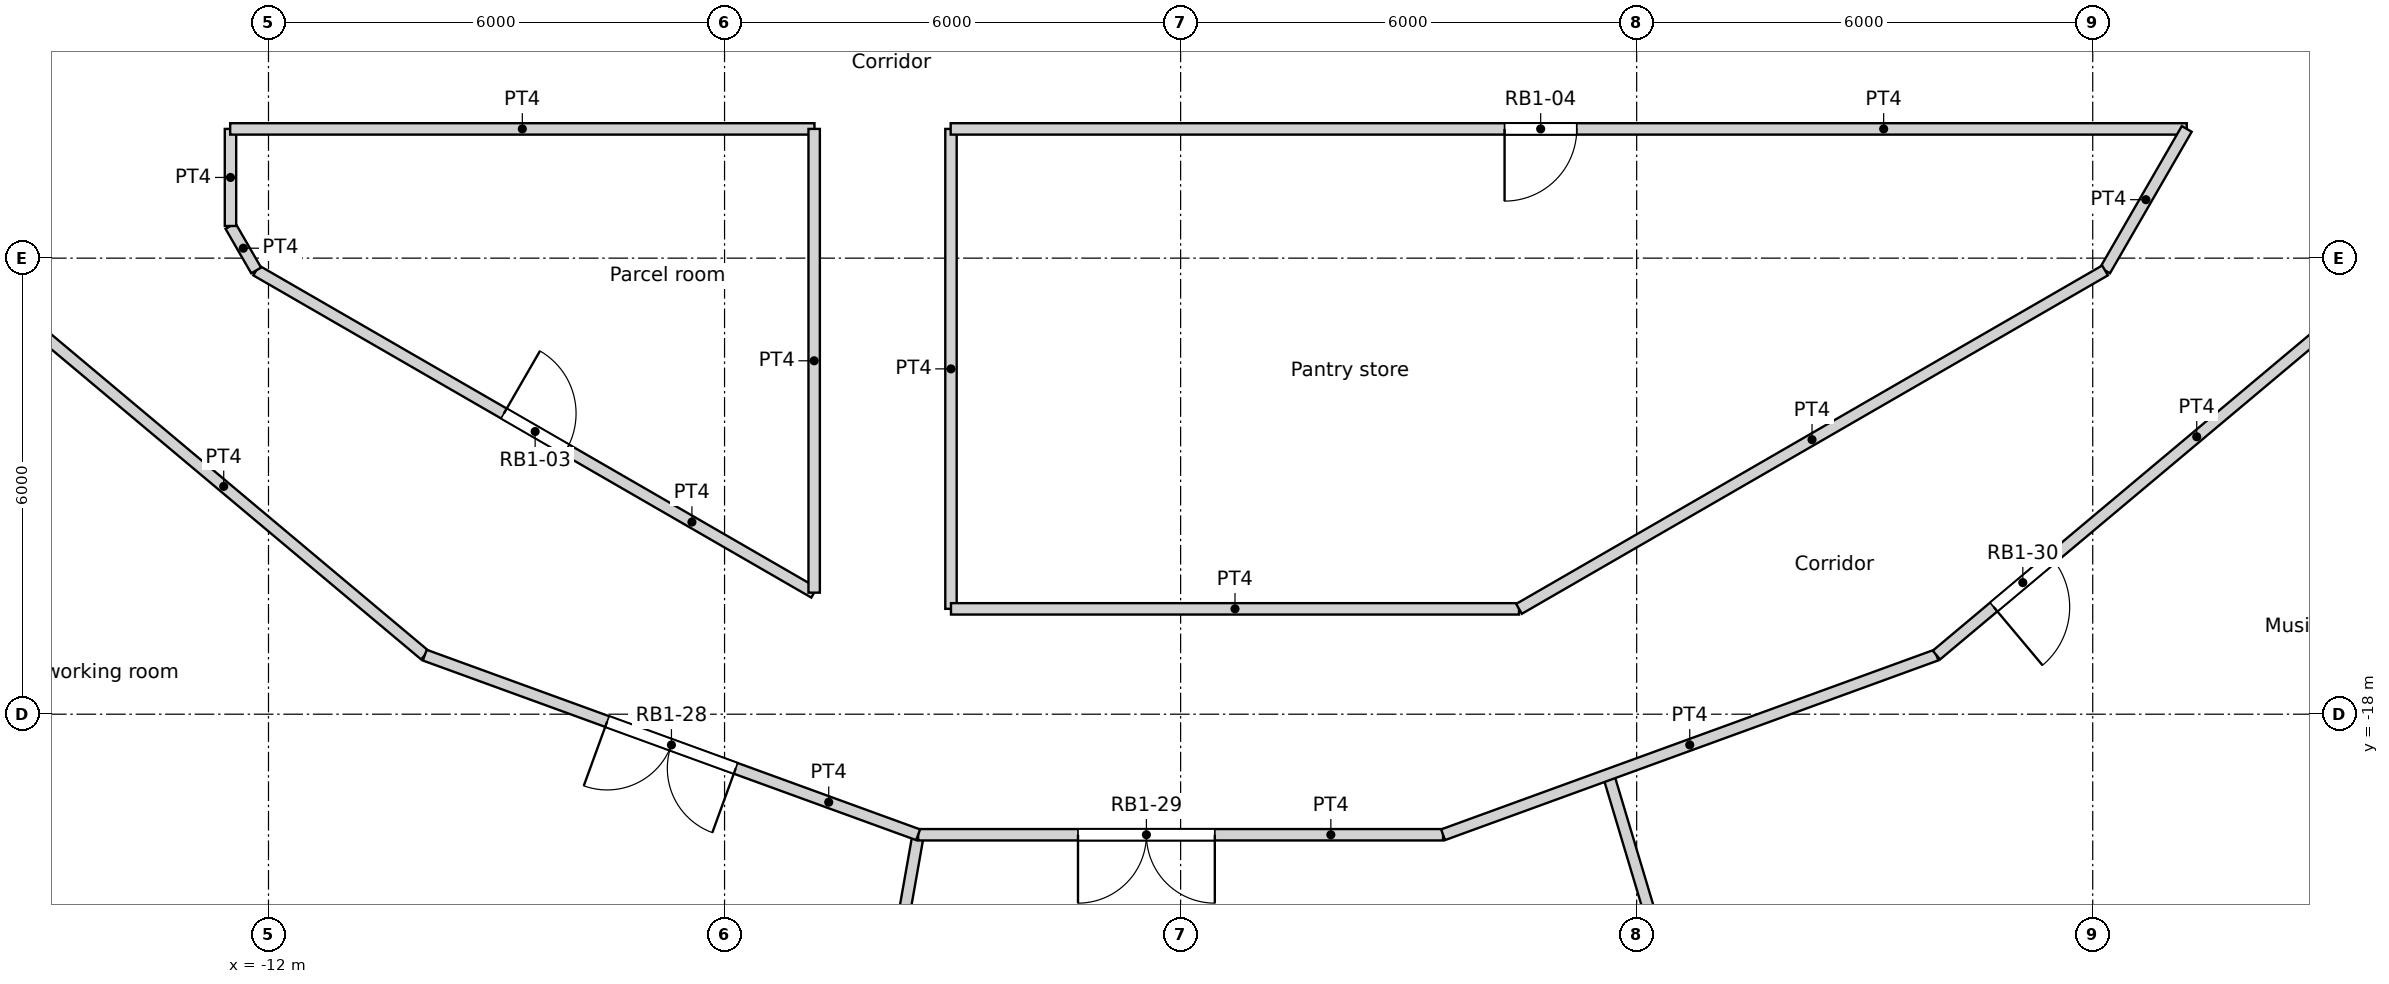
"""IFC4 building model, lengths in metres.
Left out: names, types, materials, properties, quantities, classifications, styles, units other than length and angle.
Written with IfcOpenShell. Run it as: python <this file> out.ifc"""

import sys

from ifc_helpers import new_model, si_unit, direction, frame, frame_2d, origin, origin_2d, place, context, subcontext, project, spatial, rectangle, circle, extrude, element, fill, save


model = new_model("IFC4")
c1 = context("Model", 3, precision=1e-05, world=origin(), true_north=direction((0.0, 1.0)))
c2 = subcontext(c1, "Body", "Model", "MODEL_VIEW")
j1 = project(units=[si_unit("LENGTHUNIT", "METRE"), si_unit("PLANEANGLEUNIT", "RADIAN")], contexts=[c1])
p1 = place(None, origin())
s1 = spatial("IfcSite", under=j1, at=p1, CompositionType="ELEMENT")
p2 = place(p1, origin())
s2 = spatial("IfcBuilding", under=s1, at=p2, CompositionType="ELEMENT")
p3 = place(p2, frame((0.0, 0.0, 126.0)))
s3 = spatial("IfcBuildingStorey", under=s2, at=p3, CompositionType="ELEMENT", Elevation=126.0)
p4 = place(p3, frame((14.659, -19.69, 0.0), z_axis=(0.0, 0.0, 1.0), x_axis=(1.0, 0.0, 0.0)))
e1 = element("IfcColumn", 1, at=p4, inside=s3, PredefinedType="COLUMN", context=c2, shape_type="SweptSolid", body=[
    extrude(circle(Radius=0.6, at=origin_2d()), origin(), (0.0, 0.0, 1.0), 3.6),
])
for number, where, z_axis, x_axis in (
    (2, (-13.798, -12.802, 0.0), (0.0, 0.0, 1.0), (1.0, 0.0, 0.0)),
    (3, (-9.411, -16.301, 0.0), (0.0, 0.0, 1.0), (1.0, 0.0, 0.0)),
    (4, (-4.188, -18.35, 0.0), (0.0, 0.0, 1.0), (1.0, 0.0, 0.0)),
    (5, (1.406, -18.77, 0.0), (0.0, 0.0, 1.0), (1.0, 0.0, 0.0)),
    (6, (6.876, -17.521, 0.0), (0.0, 0.0, 1.0), (1.0, 0.0, 0.0)),
    (7, (11.735, -14.716, 0.0), (0.0, 0.0, 1.0), (1.0, 0.0, 0.0)),
):
    element("IfcColumn", number, at=place(p3, frame(where, z_axis=z_axis, x_axis=x_axis)), inside=s3, PredefinedType="COLUMN", context=c2, shape_type="SweptSolid", body=[
        extrude(circle(Radius=0.65, at=origin_2d()), origin(), (0.0, 0.0, 1.0), 3.6),
    ])
p5 = place(p3, frame((-15.639, -21.048, -0.3), z_axis=(0.0, 0.0, 1.0), x_axis=(0.835514416706, -0.549468524554, 0.0)))
e8 = element("IfcWall", 8, at=p5, inside=s3, PredefinedType="ELEMENTEDWALL", context=c2, shape_type="SweptSolid", body=[
    extrude(rectangle(XDim=3.0, YDim=1.45, at=frame_2d((1.5, 0.0))), origin(), (0.0, 0.0, 1.0), 3.6),
])
p6 = place(p5, frame((1.5, 0.0, 1.85)))
e9 = element("IfcOpeningElement", 9, at=p6, cuts=e8, PredefinedType="OPENING", context=c2, shape_type="SweptSolid", body=[
    extrude(circle(Radius=0.9, at=origin_2d()), frame((0.0, 0.735, 0.0), z_axis=(0.0, -1.0, 0.0), x_axis=(1.0, 0.0, 0.0)), (0.0, 0.0, 1.0), 1.47),
])
p7 = place(p3, frame((12.832, -22.206, 0.0), z_axis=(0.0, 0.0, 1.0), x_axis=(0.835508361394, 0.54947773207, 0.0)))
e10 = element("IfcWall", 10, at=p7, inside=s3, PredefinedType="SOLIDWALL", context=c2, shape_type="SweptSolid", body=[
    extrude(rectangle(XDim=2.973, YDim=0.3, at=frame_2d((1.486, 0.0))), origin(), (0.0, 0.0, 1.0), 3.3),
])
p8 = place(p7, frame((1.486, 0.0, 1.55)))
e11 = element("IfcOpeningElement", 11, at=p8, cuts=e10, PredefinedType="OPENING", context=c2, shape_type="SweptSolid", body=[
    extrude(circle(Radius=0.9, at=origin_2d()), frame((0.0, 0.16, 0.0), z_axis=(0.0, -1.0, 0.0), x_axis=(1.0, 0.0, 0.0)), (0.0, 0.0, 1.0), 0.32),
])
p9 = place(p3, frame((-12.504, -10.3, 0.0), z_axis=(0.0, 0.0, 1.0), x_axis=(1.0, 0.0, 0.0)))
e12 = element("IfcWall", 12, at=p9, inside=s3, PredefinedType="PARTITIONING", context=c2, shape_type="SweptSolid", body=[
    extrude(rectangle(XDim=7.687, YDim=0.15, at=frame_2d((3.844, 0.0))), origin(), (0.0, 0.0, 1.0), 3.3),
])
p10 = place(p3, frame((-3.025, -10.3, 0.0), z_axis=(0.0, 0.0, 1.0), x_axis=(1.0, 0.0, 0.0)))
e13 = element("IfcWall", 13, at=p10, inside=s3, PredefinedType="PARTITIONING", context=c2, shape_type="SweptSolid", body=[
    extrude(rectangle(XDim=16.262, YDim=0.15, at=frame_2d((8.131, 0.0))), origin(), (0.0, 0.0, 1.0), 3.3),
])
p11 = place(p10, frame((7.287, 0.0, 0.0)))
e14 = element("IfcOpeningElement", 14, at=p11, cuts=e13, PredefinedType="OPENING", context=c2, shape_type="SweptSolid", body=[
    extrude(rectangle(XDim=0.95, YDim=2.1, at=frame_2d((0.475, 1.05))), frame((0.0, 0.075, 0.0), z_axis=(0.0, -1.0, 0.0), x_axis=(1.0, 0.0, 0.0)), (0.0, 0.0, 1.0), 0.15),
])
p12 = place(p3, frame((12.162, -12.162, 0.0), z_axis=(0.0, 0.0, 1.0), x_axis=(0.499961633463, 0.866047553582, 0.0)))
e15 = element("IfcWall", 15, at=p12, inside=s3, PredefinedType="PARTITIONING", context=c2, shape_type="SweptSolid", body=[
    extrude(rectangle(XDim=2.15, YDim=0.15, at=frame_2d((1.075, 0.0))), origin(), (0.0, 0.0, 1.0), 3.3),
])
p13 = place(p3, frame((9.943, -17.222, 0.0), z_axis=(0.0, 0.0, 1.0), x_axis=(0.766192104565, 0.642611592567, 0.0)))
e16 = element("IfcWall", 16, at=p13, inside=s3, PredefinedType="PARTITIONING", context=c2, shape_type="SweptSolid", body=[
    extrude(rectangle(XDim=6.906, YDim=0.15, at=frame_2d((3.453, 0.0))), origin(), (0.0, 0.0, 1.0), 3.3),
])
p14 = place(p13, frame((0.984, 0.0, 0.0)))
e17 = element("IfcOpeningElement", 17, at=p14, cuts=e16, PredefinedType="OPENING", context=c2, shape_type="SweptSolid", body=[
    extrude(rectangle(XDim=1.0, YDim=2.04, at=frame_2d((0.5, 1.02))), frame((0.0, 0.075, 0.0), z_axis=(0.0, -1.0, 0.0), x_axis=(1.0, 0.0, 0.0)), (0.0, 0.0, 1.0), 0.15),
])
p15 = place(p3, frame((-12.5, -11.577, 0.0), z_axis=(0.0, 0.0, 1.0), x_axis=(0.0, 1.0, 0.0)))
e18 = element("IfcWall", 18, at=p15, inside=s3, PredefinedType="PARTITIONING", context=c2, shape_type="SweptSolid", body=[
    extrude(rectangle(XDim=1.277, YDim=0.15, at=frame_2d((0.638, 0.0))), origin(), (0.0, 0.0, 1.0), 3.3),
])
p16 = place(p3, frame((-12.5, -11.577, 0.0), z_axis=(0.0, 0.0, 1.0), x_axis=(0.500024767483, -0.866011103799, 0.0)))
e19 = element("IfcWall", 19, at=p16, inside=s3, PredefinedType="PARTITIONING", context=c2, shape_type="SweptSolid", body=[
    extrude(rectangle(XDim=0.676, YDim=0.15, at=frame_2d((0.338, 0.0))), origin(), (0.0, 0.0, 1.0), 3.3),
])
p17 = place(p3, frame((-15.235, -12.784, 0.0), z_axis=(0.0, 0.0, 1.0), x_axis=(0.766192104565, -0.642611592567, 0.0)))
e20 = element("IfcWall", 20, at=p17, inside=s3, PredefinedType="PARTITIONING", context=c2, shape_type="SweptSolid", body=[
    extrude(rectangle(XDim=6.906, YDim=0.15, at=frame_2d((3.453, 0.0))), origin(), (0.0, 0.0, 1.0), 3.3),
])
p18 = place(p3, frame((-12.162, -12.162, 0.0), z_axis=(0.0, 0.0, 1.0), x_axis=(0.866004766557, -0.500035743023, 0.0)))
e21 = element("IfcWall", 21, at=p18, inside=s3, PredefinedType="PARTITIONING", context=c2, shape_type="SweptSolid", body=[
    extrude(rectangle(XDim=8.477, YDim=0.15, at=frame_2d((4.239, 0.0))), origin(), (0.0, 0.0, 1.0), 3.3),
])
p19 = place(p18, frame((3.763, 0.0, 0.0)))
e22 = element("IfcOpeningElement", 22, at=p19, cuts=e21, PredefinedType="OPENING", context=c2, shape_type="SweptSolid", body=[
    extrude(rectangle(XDim=0.95, YDim=2.1, at=frame_2d((0.475, 1.05))), frame((0.0, 0.075, 0.0), z_axis=(0.0, -1.0, 0.0), x_axis=(1.0, 0.0, 0.0)), (0.0, 0.0, 1.0), 0.15),
])
p20 = place(p3, frame((-4.821, -16.401, 0.0), z_axis=(0.0, 0.0, 1.0), x_axis=(0.0, 1.0, 0.0)))
e23 = element("IfcWall", 23, at=p20, inside=s3, PredefinedType="PARTITIONING", context=c2, shape_type="SweptSolid", body=[
    extrude(rectangle(XDim=6.101, YDim=0.15, at=frame_2d((3.05, 0.0))), origin(), (0.0, 0.0, 1.0), 3.3),
])
p21 = place(p3, frame((-3.021, -16.614, 0.0), z_axis=(0.0, 0.0, 1.0), x_axis=(0.0, 1.0, 0.0)))
e24 = element("IfcWall", 24, at=p21, inside=s3, PredefinedType="PARTITIONING", context=c2, shape_type="SweptSolid", body=[
    extrude(rectangle(XDim=6.314, YDim=0.15, at=frame_2d((3.157, 0.0))), origin(), (0.0, 0.0, 1.0), 3.3),
])
p22 = place(p3, frame((-3.021, -16.614, 0.0), z_axis=(0.0, 0.0, 1.0), x_axis=(1.0, 0.0, 0.0)))
e25 = element("IfcWall", 25, at=p22, inside=s3, PredefinedType="PARTITIONING", context=c2, shape_type="SweptSolid", body=[
    extrude(rectangle(XDim=7.473, YDim=0.15, at=frame_2d((3.736, 0.0))), origin(), (0.0, 0.0, 1.0), 3.3),
])
p23 = place(p3, frame((4.452, -16.614, 0.0), z_axis=(0.0, 0.0, 1.0), x_axis=(0.866005203721, 0.500034985904, 0.0)))
e26 = element("IfcWall", 26, at=p23, inside=s3, PredefinedType="PARTITIONING", context=c2, shape_type="SweptSolid", body=[
    extrude(rectangle(XDim=8.903, YDim=0.15, at=frame_2d((4.452, 0.0))), origin(), (0.0, 0.0, 1.0), 3.3),
])
p24 = place(p3, frame((-9.944, -17.223, 0.0), z_axis=(0.0, 0.0, 1.0), x_axis=(0.939672634566, -0.342075050021, 0.0)))
e27 = element("IfcWall", 27, at=p24, inside=s3, PredefinedType="PARTITIONING", context=c2, shape_type="SweptSolid", body=[
    extrude(rectangle(XDim=6.908, YDim=0.15, at=frame_2d((3.454, 0.0))), origin(), (0.0, 0.0, 1.0), 3.3),
])
p25 = place(p24, frame((2.554, 0.0, 0.0)))
e28 = element("IfcOpeningElement", 28, at=p25, cuts=e27, PredefinedType="OPENING", context=c2, shape_type="SweptSolid", body=[
    extrude(rectangle(XDim=1.8, YDim=2.1, at=frame_2d((0.9, 1.05))), frame((0.0, 0.075, 0.0), z_axis=(0.0, -1.0, 0.0), x_axis=(1.0, 0.0, 0.0)), (0.0, 0.0, 1.0), 0.15),
])
p26 = place(p3, frame((3.453, -19.586, 0.0), z_axis=(0.0, 0.0, 1.0), x_axis=(0.939607544688, 0.342253797591, 0.0)))
e29 = element("IfcWall", 29, at=p26, inside=s3, PredefinedType="PARTITIONING", context=c2, shape_type="SweptSolid", body=[
    extrude(rectangle(XDim=6.908, YDim=0.15, at=frame_2d((3.454, 0.0))), origin(), (0.0, 0.0, 1.0), 3.3),
])
p27 = place(p3, frame((-3.453, -19.586, 0.0), z_axis=(0.0, 0.0, 1.0), x_axis=(1.0, 0.0, 0.0)))
e30 = element("IfcWall", 30, at=p27, inside=s3, PredefinedType="PARTITIONING", context=c2, shape_type="SweptSolid", body=[
    extrude(rectangle(XDim=6.906, YDim=0.15, at=frame_2d((3.453, 0.0))), origin(), (0.0, 0.0, 1.0), 3.3),
])
p28 = place(p27, frame((2.103, 0.0, 0.0)))
e31 = element("IfcOpeningElement", 31, at=p28, cuts=e30, PredefinedType="OPENING", context=c2, shape_type="SweptSolid", body=[
    extrude(rectangle(XDim=1.8, YDim=2.1, at=frame_2d((0.9, 1.05))), frame((0.0, 0.075, 0.0), z_axis=(0.0, -1.0, 0.0), x_axis=(1.0, 0.0, 0.0)), (0.0, 0.0, 1.0), 0.15),
])
p29 = place(p3, frame((-4.428, -25.11, 0.0), z_axis=(0.0, 0.0, 1.0), x_axis=(0.17382754149, 0.984776109489, 0.0)))
e32 = element("IfcWall", 32, at=p29, inside=s3, PredefinedType="PARTITIONING", context=c2, shape_type="SweptSolid", body=[
    extrude(rectangle(XDim=5.61, YDim=0.15, at=frame_2d((2.805, 0.0))), origin(), (0.0, 0.0, 1.0), 3.3),
])
p30 = place(p3, frame((5.627, -18.795, 0.0), z_axis=(0.0, 0.0, 1.0), x_axis=(0.286833432865, -0.957980470464, 0.0)))
e33 = element("IfcWall", 33, at=p30, inside=s3, PredefinedType="PARTITIONING", context=c2, shape_type="SweptSolid", body=[
    extrude(rectangle(XDim=5.878, YDim=0.15, at=frame_2d((2.939, 0.0))), origin(), (0.0, 0.0, 1.0), 3.3),
])
p31 = place(p19, origin())
e34 = element("IfcDoor", 34, at=p31, inside=s3, OperationType="SINGLE_SWING_LEFT", PredefinedType="DOOR", context=c2, shape_type="SweptSolid", body=[
    extrude(rectangle(XDim=0.95, YDim=2.1, at=frame_2d((0.475, 1.05))), frame((0.0, 0.025, 0.0), z_axis=(0.0, -1.0, 0.0), x_axis=(1.0, 0.0, 0.0)), (0.0, 0.0, 1.0), 0.05),
])
fill(e22, e34)
p32 = place(p11, origin())
e35 = element("IfcDoor", 35, at=p32, inside=s3, OperationType="SINGLE_SWING_RIGHT", PredefinedType="DOOR", context=c2, shape_type="SweptSolid", body=[
    extrude(rectangle(XDim=0.95, YDim=2.1, at=frame_2d((0.475, 1.05))), frame((0.0, 0.025, 0.0), z_axis=(0.0, -1.0, 0.0), x_axis=(1.0, 0.0, 0.0)), (0.0, 0.0, 1.0), 0.05),
])
fill(e14, e35)
p33 = place(p25, origin())
e36 = element("IfcDoor", 36, at=p33, inside=s3, OperationType="DOUBLE_DOOR_SINGLE_SWING", PredefinedType="DOOR", context=c2, shape_type="SweptSolid", body=[
    extrude(rectangle(XDim=1.8, YDim=2.1, at=frame_2d((0.9, 1.05))), frame((0.0, 0.025, 0.0), z_axis=(0.0, -1.0, 0.0), x_axis=(1.0, 0.0, 0.0)), (0.0, 0.0, 1.0), 0.05),
])
fill(e28, e36)
p34 = place(p28, origin())
e37 = element("IfcDoor", 37, at=p34, inside=s3, OperationType="DOUBLE_DOOR_SINGLE_SWING", PredefinedType="DOOR", context=c2, shape_type="SweptSolid", body=[
    extrude(rectangle(XDim=1.8, YDim=2.1, at=frame_2d((0.9, 1.05))), frame((0.0, 0.025, 0.0), z_axis=(0.0, -1.0, 0.0), x_axis=(1.0, 0.0, 0.0)), (0.0, 0.0, 1.0), 0.05),
])
fill(e31, e37)
p35 = place(p14, origin())
e38 = element("IfcDoor", 38, at=p35, inside=s3, OperationType="SINGLE_SWING_RIGHT", PredefinedType="DOOR", context=c2, shape_type="SweptSolid", body=[
    extrude(rectangle(XDim=1.0, YDim=2.04, at=frame_2d((0.5, 1.02))), frame((0.0, 0.025, 0.0), z_axis=(0.0, -1.0, 0.0), x_axis=(1.0, 0.0, 0.0)), (0.0, 0.0, 1.0), 0.05),
])
fill(e17, e38)
save(model, sys.argv[1])
